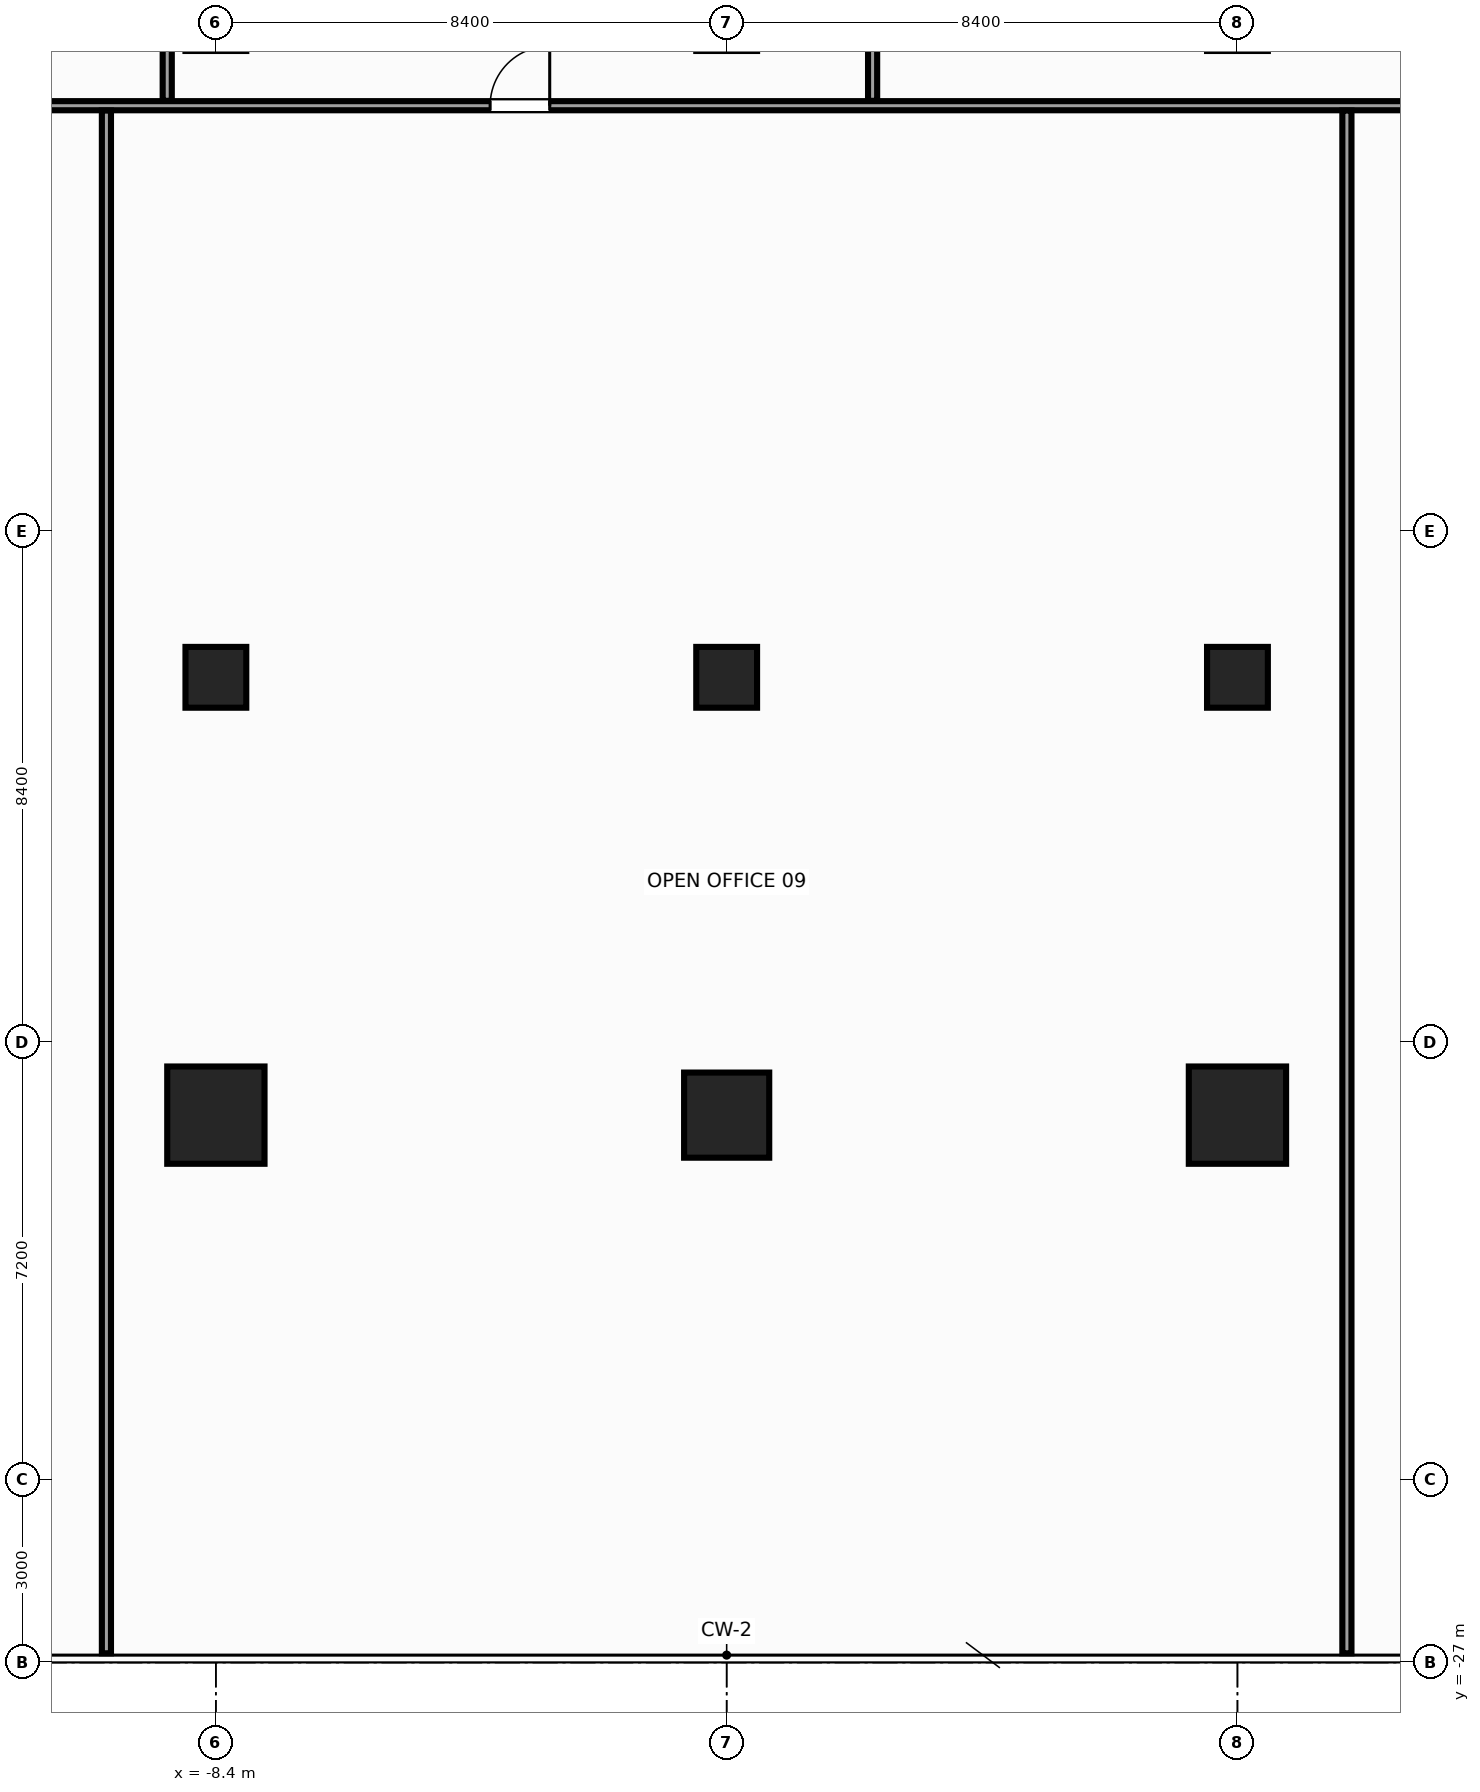
"""IFC4 building model, lengths in metres.
Left out: names, types, materials, properties, quantities, classifications, styles, units other than length and angle.
Written with IfcOpenShell. Run it as: python <this file> out.ifc"""

import sys

from ifc_helpers import new_model, si_unit, direction, frame, frame_2d, origin, origin_2d, place, context, subcontext, project, spatial, rectangle, hollow_rectangle, extrude, source, transform, mapped, element, fill, save


model = new_model("IFC4")
c1 = context("Model", 3, precision=1e-05, world=origin(), true_north=direction((0.0, 1.0)))
c2 = subcontext(c1, "Body", "Model", "MODEL_VIEW")
j1 = project(units=[si_unit("LENGTHUNIT", "METRE"), si_unit("PLANEANGLEUNIT", "RADIAN")], contexts=[c1])
p1 = place(None, origin())
s1 = spatial("IfcSite", under=j1, at=p1, CompositionType="ELEMENT")
p2 = place(p1, origin())
s2 = spatial("IfcBuilding", under=s1, at=p2, CompositionType="ELEMENT")
p3 = place(p2, frame((0.0, 0.0, 45.2)))
s3 = spatial("IfcBuildingStorey", under=s2, at=p3, CompositionType="ELEMENT", Elevation=45.2)
m1 = source(origin(), c2, "Body", "SweptSolid", [
    extrude(rectangle(XDim=1.6, YDim=1.6, at=origin_2d()), origin(), (0.0, 0.0, 1.0), 3.6),
])
p4 = place(p3, frame((-8.4, -18.0, 0.0), z_axis=(0.0, 0.0, 1.0), x_axis=(1.0, 0.0, 0.0)))
e1 = element("IfcColumn", 1, at=p4, inside=s3, PredefinedType="COLUMN", context=c2, shape_type="MappedRepresentation", body=[
    mapped(m1, transform((0.0, 0.0, 0.0), x_axis=(1.0, 0.0, 0.0), y_axis=(0.0, 1.0, 0.0), z_axis=(0.0, 0.0, 1.0), scale=1.0)),
])
m2 = source(origin(), c2, "Body", "SweptSolid", [
    extrude(hollow_rectangle(XDim=1.0, YDim=1.0, WallThickness=0.045, at=origin_2d()), origin(), (0.0, 0.0, 1.0), 3.6),
])
p5 = place(p3, frame((-8.4, -10.8, 0.0), z_axis=(0.0, 0.0, 1.0), x_axis=(1.0, 0.0, 0.0)))
e2 = element("IfcColumn", 2, at=p5, inside=s3, PredefinedType="COLUMN", context=c2, shape_type="MappedRepresentation", body=[
    mapped(m2, transform((0.0, 0.0, 0.0), x_axis=(1.0, 0.0, 0.0), y_axis=(0.0, 1.0, 0.0), z_axis=(0.0, 0.0, 1.0), scale=1.0)),
])
p6 = place(p3, frame((8.4, -18.0, 0.0), z_axis=(0.0, 0.0, 1.0), x_axis=(1.0, 0.0, 0.0)))
e3 = element("IfcColumn", 3, at=p6, inside=s3, PredefinedType="COLUMN", context=c2, shape_type="MappedRepresentation", body=[
    mapped(m1, transform((0.0, 0.0, 0.0), x_axis=(1.0, 0.0, 0.0), y_axis=(0.0, 1.0, 0.0), z_axis=(0.0, 0.0, 1.0), scale=1.0)),
])
p7 = place(p3, frame((8.4, -10.8, 0.0), z_axis=(0.0, 0.0, 1.0), x_axis=(1.0, 0.0, 0.0)))
e4 = element("IfcColumn", 4, at=p7, inside=s3, PredefinedType="COLUMN", context=c2, shape_type="MappedRepresentation", body=[
    mapped(m2, transform((0.0, 0.0, 0.0), x_axis=(1.0, 0.0, 0.0), y_axis=(0.0, 1.0, 0.0), z_axis=(0.0, 0.0, 1.0), scale=1.0)),
])
m3 = source(origin(), c2, "Body", "SweptSolid", [
    extrude(rectangle(XDim=1.4, YDim=1.4, at=origin_2d()), origin(), (0.0, 0.0, 1.0), 3.6),
])
p8 = place(p3, frame((0.0, -18.0, 0.0), z_axis=(0.0, 0.0, 1.0), x_axis=(1.0, 0.0, 0.0)))
e5 = element("IfcColumn", 5, at=p8, inside=s3, PredefinedType="COLUMN", context=c2, shape_type="MappedRepresentation", body=[
    mapped(m3, transform((0.0, 0.0, 0.0), x_axis=(1.0, 0.0, 0.0), y_axis=(0.0, 1.0, 0.0), z_axis=(0.0, 0.0, 1.0), scale=1.0)),
])
m4 = source(origin(), c2, "Body", "SweptSolid", [
    extrude(rectangle(XDim=1.0, YDim=1.0, at=origin_2d()), origin(), (0.0, 0.0, 1.0), 3.6),
])
p9 = place(p3, frame((0.0, -10.8, 0.0), z_axis=(0.0, 0.0, 1.0), x_axis=(1.0, 0.0, 0.0)))
e6 = element("IfcColumn", 6, at=p9, inside=s3, PredefinedType="COLUMN", context=c2, shape_type="MappedRepresentation", body=[
    mapped(m4, transform((0.0, 0.0, 0.0), x_axis=(1.0, 0.0, 0.0), y_axis=(0.0, 1.0, 0.0), z_axis=(0.0, 0.0, 1.0), scale=1.0)),
])
m5 = source(origin(), c2, "Body", "SweptSolid", [
    extrude(rectangle(XDim=36.69, YDim=0.15, at=frame_2d((18.345, 0.0))), origin(), (0.0, 0.0, 1.0), 2.745),
])
p10 = place(p3, frame((-18.345, -1.4, 0.0), z_axis=(0.0, 0.0, 1.0), x_axis=(1.0, 0.0, 0.0)))
e7 = element("IfcWall", 7, at=p10, inside=s3, PredefinedType="PARTITIONING", context=c2, shape_type="MappedRepresentation", body=[
    mapped(m5, transform((0.0, 0.0, 0.0), x_axis=(1.0, 0.0, 0.0), y_axis=(0.0, 1.0, 0.0), z_axis=(0.0, 0.0, 1.0), scale=1.0)),
])
p11 = place(p10, frame((14.455, 0.0, 0.0)))
e8 = element("IfcOpeningElement", 8, at=p11, cuts=e7, PredefinedType="OPENING", context=c2, shape_type="SweptSolid", body=[
    extrude(rectangle(XDim=0.98, YDim=2.15, at=frame_2d((0.49, 1.075))), frame((0.0, 0.087, 0.0), z_axis=(0.0, -1.0, 0.0), x_axis=(1.0, 0.0, 0.0)), (0.0, 0.0, 1.0), 0.174),
])
p12 = place(p10, frame((4.055, 0.0, 0.0)))
e9 = element("IfcOpeningElement", 9, at=p12, cuts=e7, PredefinedType="OPENING", context=c2, shape_type="SweptSolid", body=[
    extrude(rectangle(XDim=0.98, YDim=2.15, at=frame_2d((0.49, 1.075))), frame((0.0, 0.087, 0.0), z_axis=(0.0, -1.0, 0.0), x_axis=(1.0, 0.0, 0.0)), (0.0, 0.0, 1.0), 0.174),
])
p13 = place(p10, frame((32.415, 0.0, 0.0)))
e10 = element("IfcOpeningElement", 10, at=p13, cuts=e7, PredefinedType="OPENING", context=c2, shape_type="SweptSolid", body=[
    extrude(rectangle(XDim=0.98, YDim=2.15, at=frame_2d((0.49, 1.075))), frame((0.0, 0.087, 0.0), z_axis=(0.0, -1.0, 0.0), x_axis=(1.0, 0.0, 0.0)), (0.0, 0.0, 1.0), 0.174),
])
m6 = source(origin(), c2, "Body", "SweptSolid", [
    extrude(rectangle(XDim=8.965, YDim=0.15, at=frame_2d((4.482, 0.0))), origin(), (0.0, 0.0, 1.0), 2.645),
])
for number, where, z_axis, x_axis in (
    (11, (-9.2, -1.32, 0.0), (0.0, 0.0, 1.0), (0.0, 1.0, 0.0)),
    (12, (2.4, -1.32, 0.0), (0.0, 0.0, 1.0), (0.0, 1.0, 0.0)),
):
    element("IfcWall", number, at=place(p3, frame(where, z_axis=z_axis, x_axis=x_axis)), inside=s3, PredefinedType="PARTITIONING", context=c2, shape_type="MappedRepresentation", body=[
        mapped(m6, transform((0.0, 0.0, 0.0), x_axis=(1.0, 0.0, 0.0), y_axis=(0.0, 1.0, 0.0), z_axis=(0.0, 0.0, 1.0), scale=1.0)),
    ])
m7 = source(origin(), c2, "Body", "SweptSolid", [
    extrude(rectangle(XDim=25.37, YDim=0.15, at=frame_2d((12.685, 0.0))), origin(), (0.0, 0.0, 1.0), 2.745),
])
for number, where, z_axis, x_axis in (
    (13, (-10.2, -26.85, 0.0), (0.0, 0.0, 1.0), (0.0, 1.0, 0.0)),
    (14, (10.2, -26.85, 0.0), (0.0, 0.0, 1.0), (0.0, 1.0, 0.0)),
):
    element("IfcWall", number, at=place(p3, frame(where, z_axis=z_axis, x_axis=x_axis)), inside=s3, PredefinedType="PARTITIONING", context=c2, shape_type="MappedRepresentation", body=[
        mapped(m7, transform((0.0, 0.0, 0.0), x_axis=(1.0, 0.0, 0.0), y_axis=(0.0, 1.0, 0.0), z_axis=(0.0, 0.0, 1.0), scale=1.0)),
    ])
m8 = source(origin(), c2, "Body", "SweptSolid", [
    extrude(rectangle(XDim=0.98, YDim=2.15, at=frame_2d((0.49, 1.075))), frame((0.0, 0.025, 0.0), z_axis=(0.0, -1.0, 0.0), x_axis=(1.0, 0.0, 0.0)), (0.0, 0.0, 1.0), 0.05),
])
p14 = place(p11, origin())
e15 = element("IfcDoor", 15, at=p14, inside=s3, OperationType="SINGLE_SWING_RIGHT", PredefinedType="DOOR", context=c2, shape_type="MappedRepresentation", body=[
    mapped(m8, transform((0.0, 0.0, 0.0), x_axis=(1.0, 0.0, 0.0), y_axis=(0.0, 1.0, 0.0), z_axis=(0.0, 0.0, 1.0), scale=1.0)),
])
fill(e8, e15)
save(model, sys.argv[1])
